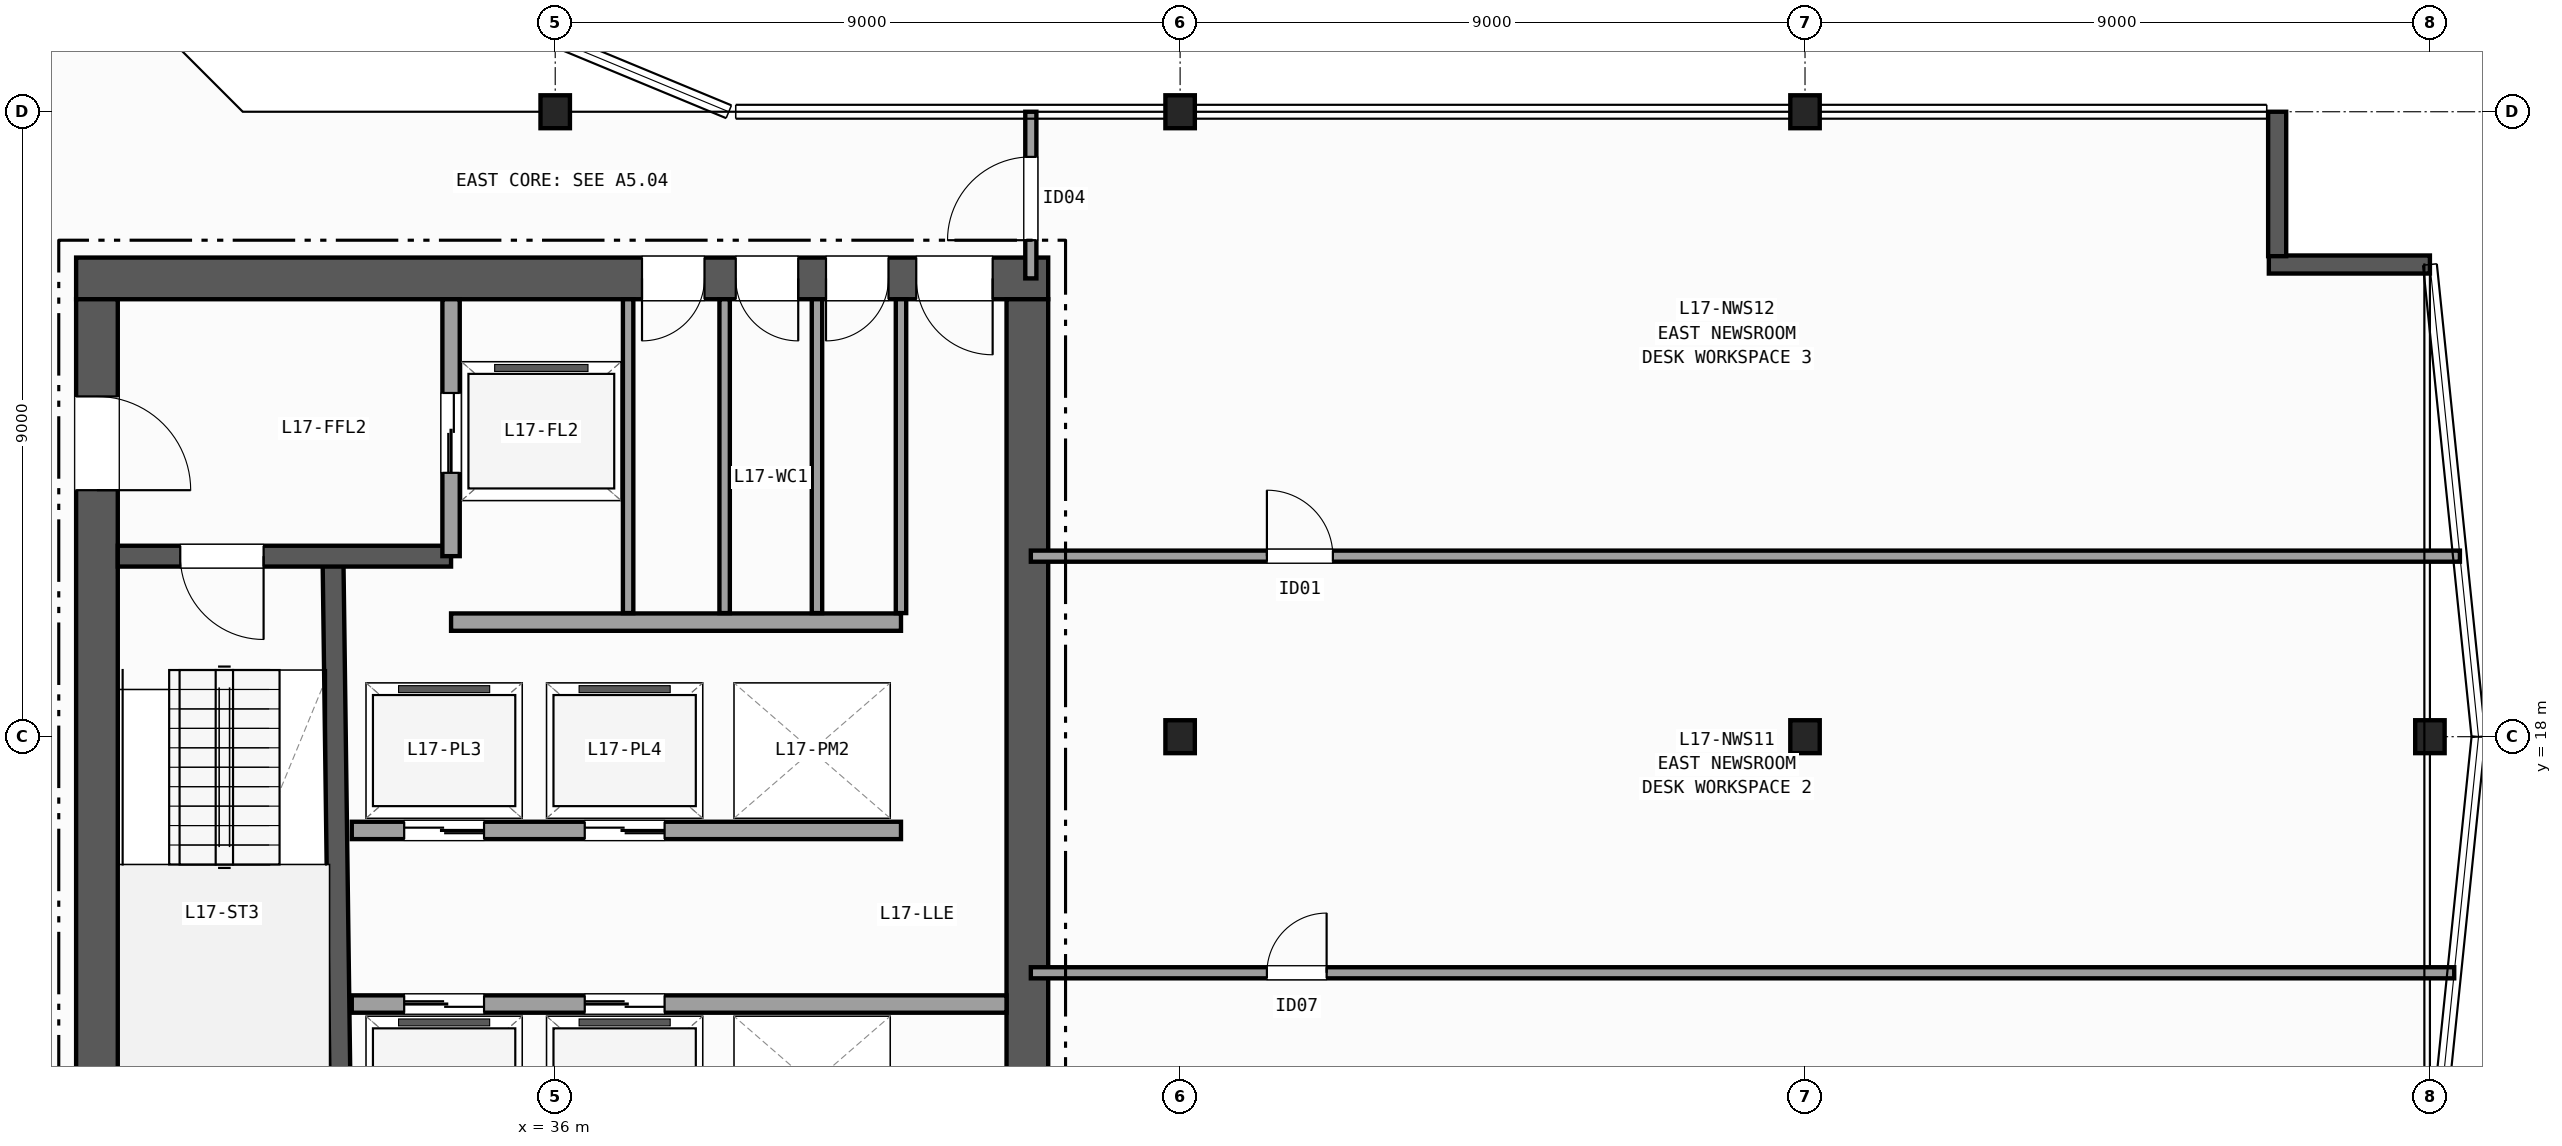
"""IFC4 building model, lengths in metres.
Left out: names, types, materials, properties, quantities, classifications, styles, units other than length and angle.
Written with IfcOpenShell. Run it as: python <this file> out.ifc"""

import sys

from ifc_helpers import new_model, si_unit, direction, frame, frame_2d, origin, origin_2d, place, context, subcontext, project, spatial, rectangle, i_section, extrude, element, fill, save


model = new_model("IFC4")
c1 = context("Model", 3, precision=1e-05, world=origin(), true_north=direction((0.0, 1.0)))
c2 = subcontext(c1, "Body", "Model", "MODEL_VIEW")
j1 = project(units=[si_unit("LENGTHUNIT", "METRE"), si_unit("PLANEANGLEUNIT", "RADIAN")], contexts=[c1])
p1 = place(None, origin())
s1 = spatial("IfcSite", under=j1, at=p1, CompositionType="ELEMENT")
p2 = place(p1, origin())
s2 = spatial("IfcBuilding", under=s1, at=p2, CompositionType="ELEMENT")
p3 = place(p2, frame((0.0, 0.0, 73.0)))
s3 = spatial("IfcBuildingStorey", under=s2, at=p3, CompositionType="ELEMENT", Elevation=73.0)
for number, where, z_axis, x_axis in (
    (1, (36.0, 27.0, 0.0), (0.0, 0.0, 1.0), (1.0, 0.0, 0.0)),
    (2, (45.0, 18.0, 0.0), (0.0, 0.0, 1.0), (1.0, 0.0, 0.0)),
    (3, (45.0, 27.0, 0.0), (0.0, 0.0, 1.0), (1.0, 0.0, 0.0)),
    (4, (54.0, 18.0, 0.0), (0.0, 0.0, 1.0), (1.0, 0.0, 0.0)),
    (5, (54.0, 27.0, 0.0), (0.0, 0.0, 1.0), (1.0, 0.0, 0.0)),
    (6, (63.0, 18.0, 0.0), (0.0, 0.0, 1.0), (1.0, 0.0, 0.0)),
):
    element("IfcColumn", number, at=place(p3, frame(where, z_axis=z_axis, x_axis=x_axis)), inside=s3, PredefinedType="COLUMN", context=c2, shape_type="SweptSolid", body=[
        extrude(i_section(OverallWidth=0.424, OverallDepth=0.474, WebThickness=0.048, FlangeThickness=0.077, FilletRadius=0.015, at=origin_2d()), origin(), (0.0, 0.0, 1.0), 3.7),
    ])
p4 = place(p3, frame((63.0, 24.8, 0.0), z_axis=(0.0, 0.0, 1.0), x_axis=(-1.0, 0.0, 0.0)))
e7 = element("IfcWall", 7, at=p4, inside=s3, PredefinedType="SOLIDWALL", context=c2, shape_type="SweptSolid", body=[
    extrude(rectangle(XDim=2.32, YDim=0.26, at=frame_2d((1.16, 0.0))), origin(), (0.0, 0.0, 1.0), 3.42),
])
p5 = place(p3, frame((60.8, 24.92, 0.0), z_axis=(0.0, 0.0, 1.0), x_axis=(0.0, 1.0, 0.0)))
e8 = element("IfcWall", 8, at=p5, inside=s3, PredefinedType="SOLIDWALL", context=c2, shape_type="SweptSolid", body=[
    extrude(rectangle(XDim=2.08, YDim=0.26, at=frame_2d((1.04, 0.0))), origin(), (0.0, 0.0, 1.0), 3.42),
])
p6 = place(p3, frame((43.1, 24.6, 0.0), z_axis=(0.0, 0.0, 1.0), x_axis=(-1.0, 0.0, 0.0)))
e9 = element("IfcWall", 9, at=p6, inside=s3, PredefinedType="SHEAR", context=c2, shape_type="SweptSolid", body=[
    extrude(rectangle(XDim=14.0, YDim=0.6, at=frame_2d((7.0, 0.0))), origin(), (0.0, 0.0, 1.0), 3.42),
])
p7 = place(p6, frame((0.8, 0.0, 0.0)))
e10 = element("IfcOpeningElement", 10, at=p7, cuts=e9, PredefinedType="OPENING", context=c2, shape_type="SweptSolid", body=[
    extrude(rectangle(XDim=1.1, YDim=2.15, at=frame_2d((0.55, 1.075))), frame((0.0, 0.31, 0.0), z_axis=(0.0, -1.0, 0.0), x_axis=(1.0, 0.0, 0.0)), (0.0, 0.0, 1.0), 0.62),
])
p8 = place(p6, frame((2.3, 0.0, 0.0)))
e11 = element("IfcOpeningElement", 11, at=p8, cuts=e9, PredefinedType="OPENING", context=c2, shape_type="SweptSolid", body=[
    extrude(rectangle(XDim=0.9, YDim=2.1, at=frame_2d((0.45, 1.05))), frame((0.0, 0.31, 0.0), z_axis=(0.0, -1.0, 0.0), x_axis=(1.0, 0.0, 0.0)), (0.0, 0.0, 1.0), 0.62),
])
p9 = place(p6, frame((3.6, 0.0, 0.0)))
e12 = element("IfcOpeningElement", 12, at=p9, cuts=e9, PredefinedType="OPENING", context=c2, shape_type="SweptSolid", body=[
    extrude(rectangle(XDim=0.9, YDim=2.1, at=frame_2d((0.45, 1.05))), frame((0.0, 0.31, 0.0), z_axis=(0.0, -1.0, 0.0), x_axis=(1.0, 0.0, 0.0)), (0.0, 0.0, 1.0), 0.62),
])
p10 = place(p6, frame((4.95, 0.0, 0.0)))
e13 = element("IfcOpeningElement", 13, at=p10, cuts=e9, PredefinedType="OPENING", context=c2, shape_type="SweptSolid", body=[
    extrude(rectangle(XDim=0.9, YDim=2.1, at=frame_2d((0.45, 1.05))), frame((0.0, 0.31, 0.0), z_axis=(0.0, -1.0, 0.0), x_axis=(1.0, 0.0, 0.0)), (0.0, 0.0, 1.0), 0.62),
])
p11 = place(p3, frame((29.4, 24.3, 0.0), z_axis=(0.0, 0.0, 1.0), x_axis=(0.0, -1.0, 0.0)))
e14 = element("IfcWall", 14, at=p11, inside=s3, PredefinedType="SHEAR", context=c2, shape_type="SweptSolid", body=[
    extrude(rectangle(XDim=12.8, YDim=0.6, at=frame_2d((6.4, 0.0))), origin(), (0.0, 0.0, 1.0), 3.42),
])
p12 = place(p11, frame((1.4, 0.0, 0.0)))
e15 = element("IfcOpeningElement", 15, at=p12, cuts=e14, PredefinedType="OPENING", context=c2, shape_type="SweptSolid", body=[
    extrude(rectangle(XDim=1.35, YDim=2.15, at=frame_2d((0.675, 1.075))), frame((0.0, 0.31, 0.0), z_axis=(0.0, -1.0, 0.0), x_axis=(1.0, 0.0, 0.0)), (0.0, 0.0, 1.0), 0.62),
])
p13 = place(p3, frame((42.8, 11.5, 0.0), z_axis=(0.0, 0.0, 1.0), x_axis=(0.0, 1.0, 0.0)))
e16 = element("IfcWall", 16, at=p13, inside=s3, PredefinedType="SHEAR", context=c2, shape_type="SweptSolid", body=[
    extrude(rectangle(XDim=12.8, YDim=0.6, at=frame_2d((6.4, 0.0))), origin(), (0.0, 0.0, 1.0), 3.42),
])
p14 = place(p3, frame((32.92, 11.5, 0.0), z_axis=(0.0, 0.0, 1.0), x_axis=(-0.013244407292, 0.999912288991, 0.0)))
e17 = element("IfcWall", 17, at=p14, inside=s3, PredefinedType="SHEAR", context=c2, shape_type="SweptSolid", body=[
    extrude(rectangle(XDim=9.051, YDim=0.3, at=frame_2d((4.525, 0.0))), origin(), (0.0, 0.0, 1.0), 3.42),
])
p15 = place(p3, frame((34.5, 20.6, 0.0), z_axis=(0.0, 0.0, 1.0), x_axis=(-1.0, 0.0, 0.0)))
e18 = element("IfcWall", 18, at=p15, inside=s3, PredefinedType="SHEAR", context=c2, shape_type="SweptSolid", body=[
    extrude(rectangle(XDim=4.8, YDim=0.3, at=frame_2d((2.4, 0.0))), origin(), (0.0, 0.0, 1.0), 3.42),
])
p16 = place(p15, frame((2.7, 0.0, 0.0)))
e19 = element("IfcOpeningElement", 19, at=p16, cuts=e18, PredefinedType="OPENING", context=c2, shape_type="SweptSolid", body=[
    extrude(rectangle(XDim=1.2, YDim=2.15, at=frame_2d((0.6, 1.075))), frame((0.0, 0.16, 0.0), z_axis=(0.0, -1.0, 0.0), x_axis=(1.0, 0.0, 0.0)), (0.0, 0.0, 1.0), 0.32),
])
p17 = place(p3, frame((34.5, 20.6, 0.0), z_axis=(0.0, 0.0, 1.0), x_axis=(0.0, 1.0, 0.0)))
e20 = element("IfcWall", 20, at=p17, inside=s3, PredefinedType="PARTITIONING", context=c2, shape_type="SweptSolid", body=[
    extrude(rectangle(XDim=3.7, YDim=0.25, at=frame_2d((1.85, 0.0))), origin(), (0.0, 0.0, 1.0), 3.42),
])
p18 = place(p17, frame((1.2, 0.0, 0.0)))
e21 = element("IfcOpeningElement", 21, at=p18, cuts=e20, PredefinedType="OPENING", context=c2, shape_type="SweptSolid", body=[
    extrude(rectangle(XDim=1.15, YDim=2.15, at=frame_2d((0.575, 1.075))), frame((0.0, 0.135, 0.0), z_axis=(0.0, -1.0, 0.0), x_axis=(1.0, 0.0, 0.0)), (0.0, 0.0, 1.0), 0.27),
])
p19 = place(p3, frame((34.5, 19.65, 0.0), z_axis=(0.0, 0.0, 1.0), x_axis=(1.0, 0.0, 0.0)))
e22 = element("IfcWall", 22, at=p19, inside=s3, PredefinedType="PARTITIONING", context=c2, shape_type="SweptSolid", body=[
    extrude(rectangle(XDim=6.48, YDim=0.25, at=frame_2d((3.24, 0.0))), origin(), (0.0, 0.0, 1.0), 3.42),
])
p20 = place(p3, frame((33.07, 14.15, 0.0), z_axis=(0.0, 0.0, 1.0), x_axis=(1.0, 0.0, 0.0)))
e23 = element("IfcWall", 23, at=p20, inside=s3, PredefinedType="PARTITIONING", context=c2, shape_type="SweptSolid", body=[
    extrude(rectangle(XDim=9.43, YDim=0.25, at=frame_2d((4.715, 0.0))), origin(), (0.0, 0.0, 1.0), 3.42),
])
p21 = place(p20, frame((0.755, 0.0, 0.0)))
e24 = element("IfcOpeningElement", 24, at=p21, cuts=e23, PredefinedType="OPENING", context=c2, shape_type="SweptSolid", body=[
    extrude(rectangle(XDim=1.15, YDim=2.15, at=frame_2d((0.575, 1.075))), frame((0.0, 0.135, 0.0), z_axis=(0.0, -1.0, 0.0), x_axis=(1.0, 0.0, 0.0)), (0.0, 0.0, 1.0), 0.27),
])
p22 = place(p20, frame((3.355, 0.0, 0.0)))
e25 = element("IfcOpeningElement", 25, at=p22, cuts=e23, PredefinedType="OPENING", context=c2, shape_type="SweptSolid", body=[
    extrude(rectangle(XDim=1.15, YDim=2.15, at=frame_2d((0.575, 1.075))), frame((0.0, 0.135, 0.0), z_axis=(0.0, -1.0, 0.0), x_axis=(1.0, 0.0, 0.0)), (0.0, 0.0, 1.0), 0.27),
])
p23 = place(p3, frame((40.98, 16.65, 0.0), z_axis=(0.0, 0.0, 1.0), x_axis=(-1.0, 0.0, 0.0)))
e26 = element("IfcWall", 26, at=p23, inside=s3, PredefinedType="PARTITIONING", context=c2, shape_type="SweptSolid", body=[
    extrude(rectangle(XDim=7.91, YDim=0.25, at=frame_2d((3.955, 0.0))), origin(), (0.0, 0.0, 1.0), 3.42),
])
p24 = place(p23, frame((6.005, 0.0, 0.0)))
e27 = element("IfcOpeningElement", 27, at=p24, cuts=e26, PredefinedType="OPENING", context=c2, shape_type="SweptSolid", body=[
    extrude(rectangle(XDim=1.15, YDim=2.15, at=frame_2d((0.575, 1.075))), frame((0.0, 0.135, 0.0), z_axis=(0.0, -1.0, 0.0), x_axis=(1.0, 0.0, 0.0)), (0.0, 0.0, 1.0), 0.27),
])
p25 = place(p23, frame((3.405, 0.0, 0.0)))
e28 = element("IfcOpeningElement", 28, at=p25, cuts=e26, PredefinedType="OPENING", context=c2, shape_type="SweptSolid", body=[
    extrude(rectangle(XDim=1.15, YDim=2.15, at=frame_2d((0.575, 1.075))), frame((0.0, 0.135, 0.0), z_axis=(0.0, -1.0, 0.0), x_axis=(1.0, 0.0, 0.0)), (0.0, 0.0, 1.0), 0.27),
])
for number, where, z_axis, x_axis in (
    (29, (37.05, 19.78, 0.0), (0.0, 0.0, 1.0), (0.0, 1.0, 0.0)),
    (30, (38.44, 19.78, 0.0), (0.0, 0.0, 1.0), (0.0, 1.0, 0.0)),
    (31, (39.77, 19.78, 0.0), (0.0, 0.0, 1.0), (0.0, 1.0, 0.0)),
    (32, (40.98, 19.78, 0.0), (0.0, 0.0, 1.0), (0.0, 1.0, 0.0)),
):
    element("IfcWall", number, at=place(p3, frame(where, z_axis=z_axis, x_axis=x_axis)), inside=s3, PredefinedType="PARTITIONING", context=c2, shape_type="SweptSolid", body=[
        extrude(rectangle(XDim=4.52, YDim=0.15, at=frame_2d((2.26, 0.0))), origin(), (0.0, 0.0, 1.0), 3.42),
    ])
p26 = place(p3, frame((42.85, 24.6, 0.0), z_axis=(0.0, 0.0, 1.0), x_axis=(0.0, 1.0, 0.0)))
e33 = element("IfcWall", 33, at=p26, inside=s3, PredefinedType="PARTITIONING", context=c2, shape_type="SweptSolid", body=[
    extrude(rectangle(XDim=2.4, YDim=0.16, at=frame_2d((1.2, 0.0))), origin(), (0.0, 0.0, 1.0), 2.627),
])
p27 = place(p26, frame((0.55, 0.0, 0.0)))
e34 = element("IfcOpeningElement", 34, at=p27, cuts=e33, PredefinedType="OPENING", context=c2, shape_type="SweptSolid", body=[
    extrude(rectangle(XDim=1.2, YDim=2.15, at=frame_2d((0.6, 1.075))), frame((0.0, 0.09, 0.0), z_axis=(0.0, -1.0, 0.0), x_axis=(1.0, 0.0, 0.0)), (0.0, 0.0, 1.0), 0.18),
])
p28 = place(p3, frame((42.85, 14.6, 0.0), z_axis=(0.0, 0.0, 1.0), x_axis=(1.0, 0.0, 0.0)))
e35 = element("IfcWall", 35, at=p28, inside=s3, PredefinedType="PARTITIONING", context=c2, shape_type="SweptSolid", body=[
    extrude(rectangle(XDim=20.5, YDim=0.16, at=frame_2d((10.25, 0.0))), origin(), (0.0, 0.0, 1.0), 3.42),
])
p29 = place(p28, frame((3.4, 0.0, 0.0)))
e36 = element("IfcOpeningElement", 36, at=p29, cuts=e35, PredefinedType="OPENING", context=c2, shape_type="SweptSolid", body=[
    extrude(rectangle(XDim=0.86, YDim=2.05, at=frame_2d((0.43, 1.025))), frame((0.0, 0.09, 0.0), z_axis=(0.0, -1.0, 0.0), x_axis=(1.0, 0.0, 0.0)), (0.0, 0.0, 1.0), 0.18),
])
p30 = place(p3, frame((42.85, 20.6, 0.0), z_axis=(0.0, 0.0, 1.0), x_axis=(1.0, 0.0, 0.0)))
e37 = element("IfcWall", 37, at=p30, inside=s3, PredefinedType="PARTITIONING", context=c2, shape_type="SweptSolid", body=[
    extrude(rectangle(XDim=20.582, YDim=0.16, at=frame_2d((10.291, 0.0))), origin(), (0.0, 0.0, 1.0), 3.42),
])
p31 = place(p30, frame((3.4, 0.0, 0.0)))
e38 = element("IfcOpeningElement", 38, at=p31, cuts=e37, PredefinedType="OPENING", context=c2, shape_type="SweptSolid", body=[
    extrude(rectangle(XDim=0.95, YDim=2.1, at=frame_2d((0.475, 1.05))), frame((0.0, 0.09, 0.0), z_axis=(0.0, -1.0, 0.0), x_axis=(1.0, 0.0, 0.0)), (0.0, 0.0, 1.0), 0.18),
])
p32 = place(p16, origin())
e39 = element("IfcDoor", 39, at=p32, inside=s3, OperationType="SINGLE_SWING_LEFT", PredefinedType="DOOR", context=c2, shape_type="SweptSolid", body=[
    extrude(rectangle(XDim=1.2, YDim=2.15, at=frame_2d((0.6, 1.075))), frame((0.0, 0.025, 0.0), z_axis=(0.0, -1.0, 0.0), x_axis=(1.0, 0.0, 0.0)), (0.0, 0.0, 1.0), 0.05),
])
fill(e19, e39)
p33 = place(p12, origin())
e40 = element("IfcDoor", 40, at=p33, inside=s3, OperationType="SINGLE_SWING_RIGHT", PredefinedType="DOOR", context=c2, shape_type="SweptSolid", body=[
    extrude(rectangle(XDim=1.35, YDim=2.15, at=frame_2d((0.675, 1.075))), frame((0.0, 0.025, 0.0), z_axis=(0.0, -1.0, 0.0), x_axis=(1.0, 0.0, 0.0)), (0.0, 0.0, 1.0), 0.05),
])
fill(e15, e40)
p34 = place(p7, origin())
e41 = element("IfcDoor", 41, at=p34, inside=s3, OperationType="SINGLE_SWING_LEFT", PredefinedType="DOOR", context=c2, shape_type="SweptSolid", body=[
    extrude(rectangle(XDim=1.1, YDim=2.15, at=frame_2d((0.55, 1.075))), frame((0.0, 0.025, 0.0), z_axis=(0.0, -1.0, 0.0), x_axis=(1.0, 0.0, 0.0)), (0.0, 0.0, 1.0), 0.05),
])
fill(e10, e41)
p35 = place(p8, origin())
e42 = element("IfcDoor", 42, at=p35, inside=s3, OperationType="SINGLE_SWING_RIGHT", PredefinedType="DOOR", context=c2, shape_type="SweptSolid", body=[
    extrude(rectangle(XDim=0.9, YDim=2.1, at=frame_2d((0.45, 1.05))), frame((0.0, 0.025, 0.0), z_axis=(0.0, -1.0, 0.0), x_axis=(1.0, 0.0, 0.0)), (0.0, 0.0, 1.0), 0.05),
])
fill(e11, e42)
p36 = place(p9, origin())
e43 = element("IfcDoor", 43, at=p36, inside=s3, OperationType="SINGLE_SWING_LEFT", PredefinedType="DOOR", context=c2, shape_type="SweptSolid", body=[
    extrude(rectangle(XDim=0.9, YDim=2.1, at=frame_2d((0.45, 1.05))), frame((0.0, 0.025, 0.0), z_axis=(0.0, -1.0, 0.0), x_axis=(1.0, 0.0, 0.0)), (0.0, 0.0, 1.0), 0.05),
])
fill(e12, e43)
p37 = place(p10, origin())
e44 = element("IfcDoor", 44, at=p37, inside=s3, OperationType="SINGLE_SWING_RIGHT", PredefinedType="DOOR", context=c2, shape_type="SweptSolid", body=[
    extrude(rectangle(XDim=0.9, YDim=2.1, at=frame_2d((0.45, 1.05))), frame((0.0, 0.025, 0.0), z_axis=(0.0, -1.0, 0.0), x_axis=(1.0, 0.0, 0.0)), (0.0, 0.0, 1.0), 0.05),
])
fill(e13, e44)
p38 = place(p18, origin())
e45 = element("IfcDoor", 45, at=p38, inside=s3, OperationType="DOUBLE_DOOR_SLIDING", PredefinedType="DOOR", context=c2, shape_type="SweptSolid", body=[
    extrude(rectangle(XDim=1.15, YDim=2.15, at=frame_2d((0.575, 1.075))), frame((0.0, 0.025, 0.0), z_axis=(0.0, -1.0, 0.0), x_axis=(1.0, 0.0, 0.0)), (0.0, 0.0, 1.0), 0.05),
])
fill(e21, e45)
p39 = place(p21, origin())
e46 = element("IfcDoor", 46, at=p39, inside=s3, OperationType="DOUBLE_DOOR_SLIDING", PredefinedType="DOOR", context=c2, shape_type="SweptSolid", body=[
    extrude(rectangle(XDim=1.15, YDim=2.15, at=frame_2d((0.575, 1.075))), frame((0.0, 0.025, 0.0), z_axis=(0.0, -1.0, 0.0), x_axis=(1.0, 0.0, 0.0)), (0.0, 0.0, 1.0), 0.05),
])
fill(e24, e46)
p40 = place(p22, origin())
e47 = element("IfcDoor", 47, at=p40, inside=s3, OperationType="DOUBLE_DOOR_SLIDING", PredefinedType="DOOR", context=c2, shape_type="SweptSolid", body=[
    extrude(rectangle(XDim=1.15, YDim=2.15, at=frame_2d((0.575, 1.075))), frame((0.0, 0.025, 0.0), z_axis=(0.0, -1.0, 0.0), x_axis=(1.0, 0.0, 0.0)), (0.0, 0.0, 1.0), 0.05),
])
fill(e25, e47)
p41 = place(p24, origin())
e48 = element("IfcDoor", 48, at=p41, inside=s3, OperationType="DOUBLE_DOOR_SLIDING", PredefinedType="DOOR", context=c2, shape_type="SweptSolid", body=[
    extrude(rectangle(XDim=1.15, YDim=2.15, at=frame_2d((0.575, 1.075))), frame((0.0, 0.025, 0.0), z_axis=(0.0, -1.0, 0.0), x_axis=(1.0, 0.0, 0.0)), (0.0, 0.0, 1.0), 0.05),
])
fill(e27, e48)
p42 = place(p25, origin())
e49 = element("IfcDoor", 49, at=p42, inside=s3, OperationType="DOUBLE_DOOR_SLIDING", PredefinedType="DOOR", context=c2, shape_type="SweptSolid", body=[
    extrude(rectangle(XDim=1.15, YDim=2.15, at=frame_2d((0.575, 1.075))), frame((0.0, 0.025, 0.0), z_axis=(0.0, -1.0, 0.0), x_axis=(1.0, 0.0, 0.0)), (0.0, 0.0, 1.0), 0.05),
])
fill(e28, e49)
p43 = place(p27, origin())
e50 = element("IfcDoor", 50, at=p43, inside=s3, OperationType="SINGLE_SWING_LEFT", PredefinedType="DOOR", context=c2, shape_type="SweptSolid", body=[
    extrude(rectangle(XDim=1.2, YDim=2.15, at=frame_2d((0.6, 1.075))), frame((0.0, 0.025, 0.0), z_axis=(0.0, -1.0, 0.0), x_axis=(1.0, 0.0, 0.0)), (0.0, 0.0, 1.0), 0.05),
])
fill(e34, e50)
p44 = place(p29, origin())
e51 = element("IfcDoor", 51, at=p44, inside=s3, OperationType="SINGLE_SWING_RIGHT", PredefinedType="DOOR", context=c2, shape_type="SweptSolid", body=[
    extrude(rectangle(XDim=0.86, YDim=2.05, at=frame_2d((0.43, 1.025))), frame((0.0, 0.025, 0.0), z_axis=(0.0, -1.0, 0.0), x_axis=(1.0, 0.0, 0.0)), (0.0, 0.0, 1.0), 0.05),
])
fill(e36, e51)
p45 = place(p31, origin())
e52 = element("IfcDoor", 52, at=p45, inside=s3, OperationType="SINGLE_SWING_LEFT", PredefinedType="DOOR", context=c2, shape_type="SweptSolid", body=[
    extrude(rectangle(XDim=0.95, YDim=2.1, at=frame_2d((0.475, 1.05))), frame((0.0, 0.025, 0.0), z_axis=(0.0, -1.0, 0.0), x_axis=(1.0, 0.0, 0.0)), (0.0, 0.0, 1.0), 0.05),
])
fill(e38, e52)
save(model, sys.argv[1])
